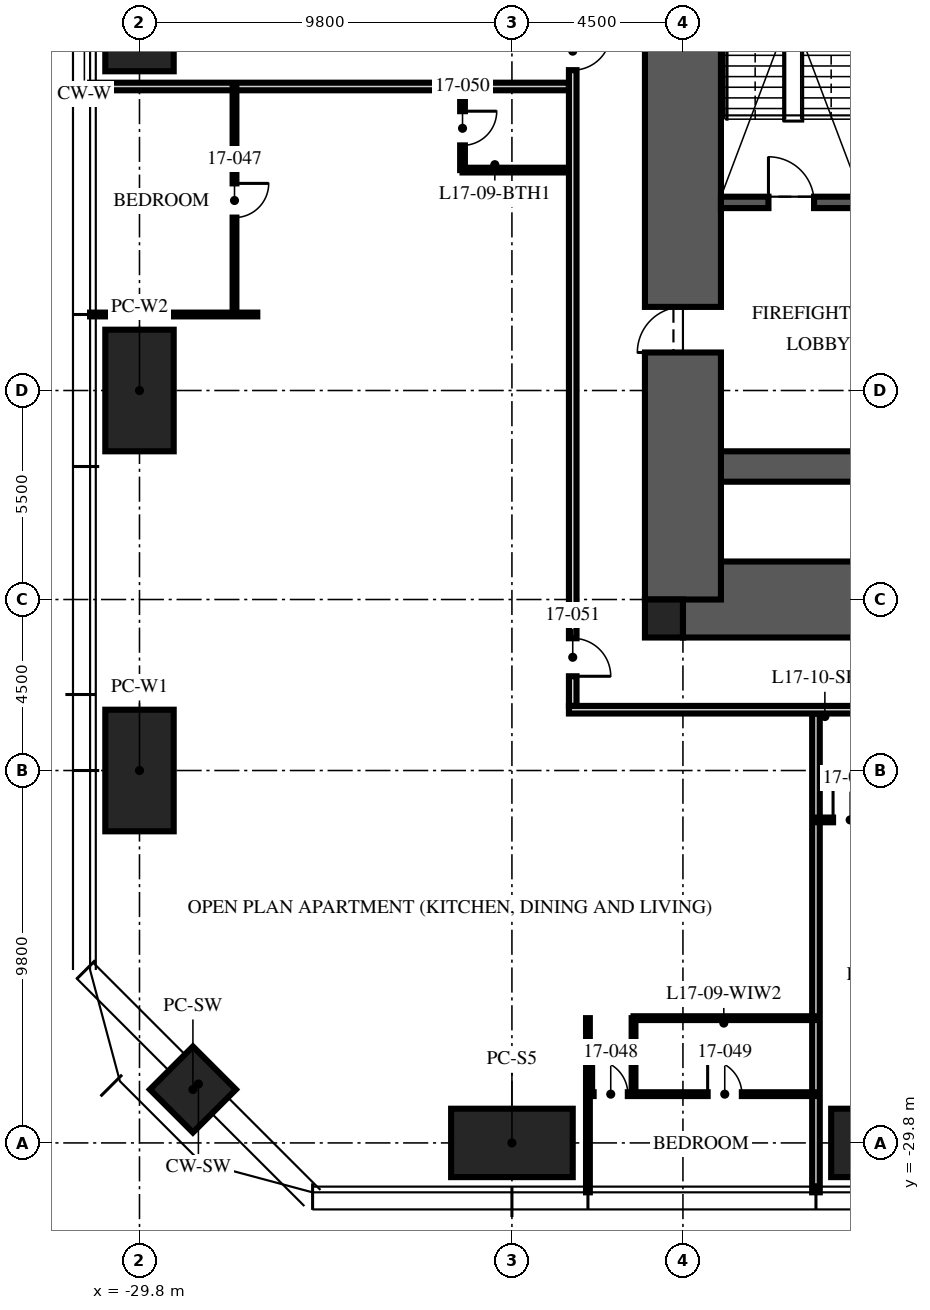
"""IFC4 building model, lengths in metres.
Left out: names, types, materials, properties, quantities, classifications, styles, units other than length and angle.
Written with IfcOpenShell. Run it as: python <this file> out.ifc"""

import sys

from ifc_helpers import new_model, si_unit, direction, frame, frame_2d, origin, origin_2d, place, context, subcontext, project, spatial, rectangle, hollow_rectangle, extrude, element, fill, save


model = new_model("IFC4")
c1 = context("Model", 3, precision=1e-05, world=origin(), true_north=direction((0.0, 1.0)))
c2 = subcontext(c1, "Body", "Model", "MODEL_VIEW")
j1 = project(units=[si_unit("LENGTHUNIT", "METRE"), si_unit("PLANEANGLEUNIT", "RADIAN")], contexts=[c1])
p1 = place(None, origin())
s1 = spatial("IfcSite", under=j1, at=p1, CompositionType="ELEMENT")
p2 = place(p1, origin())
s2 = spatial("IfcBuilding", under=s1, at=p2, CompositionType="ELEMENT")
p3 = place(p2, frame((0.0, 0.0, 69.75)))
s3 = spatial("IfcBuildingStorey", under=s2, at=p3, CompositionType="ELEMENT", Elevation=69.75)
p4 = place(p3, frame((-15.5, -15.5, -0.25), z_axis=(0.0, 0.0, 1.0), x_axis=(1.0, 0.0, 0.0)))
e1 = element("IfcWall", 1, at=p4, inside=s3, PredefinedType="SHEAR", context=c2, shape_type="SweptSolid", body=[
    extrude(rectangle(XDim=31.0, YDim=2.0, at=frame_2d((15.5, 0.0))), origin(), (0.0, 0.0, 1.0), 3.75),
])
p5 = place(p3, frame((-15.5, -12.0, -0.25), z_axis=(0.0, 0.0, 1.0), x_axis=(1.0, 0.0, 0.0)))
e2 = element("IfcWall", 2, at=p5, inside=s3, PredefinedType="SHEAR", context=c2, shape_type="SweptSolid", body=[
    extrude(rectangle(XDim=31.0, YDim=0.8, at=frame_2d((15.5, 0.0))), origin(), (0.0, 0.0, 1.0), 3.75),
])
p6 = place(p3, frame((-15.5, -15.5, -0.25), z_axis=(0.0, 0.0, 1.0), x_axis=(0.0, 1.0, 0.0)))
e3 = element("IfcWall", 3, at=p6, inside=s3, PredefinedType="SHEAR", context=c2, shape_type="SweptSolid", body=[
    extrude(rectangle(XDim=31.0, YDim=2.0, at=frame_2d((15.5, 0.0))), origin(), (0.0, 0.0, 1.0), 3.75),
])
p7 = place(p6, frame((6.5, 0.0, 0.25)))
e4 = element("IfcOpeningElement", 4, at=p7, cuts=e3, PredefinedType="OPENING", context=c2, shape_type="SweptSolid", body=[
    extrude(rectangle(XDim=1.2, YDim=2.1, at=frame_2d((0.6, 1.05))), frame((0.0, 1.01, 0.0), z_axis=(0.0, -1.0, 0.0), x_axis=(1.0, 0.0, 0.0)), (0.0, 0.0, 1.0), 2.02),
])
p8 = place(p6, frame((23.0, 0.0, 0.25)))
e5 = element("IfcOpeningElement", 5, at=p8, cuts=e3, PredefinedType="OPENING", context=c2, shape_type="SweptSolid", body=[
    extrude(rectangle(XDim=1.8, YDim=2.1, at=frame_2d((0.9, 1.05))), frame((0.0, 1.01, 0.0), z_axis=(0.0, -1.0, 0.0), x_axis=(1.0, 0.0, 0.0)), (0.0, 0.0, 1.0), 2.02),
])
p9 = place(p3, frame((-16.0, -16.0, -0.25), z_axis=(0.0, 0.0, 1.0), x_axis=(1.0, 0.0, 0.0)))
e6 = element("IfcColumn", 6, at=p9, inside=s3, PredefinedType="COLUMN", context=c2, shape_type="SweptSolid", body=[
    extrude(rectangle(XDim=1.0, YDim=1.0, at=origin_2d()), origin(), (0.0, 0.0, 1.0), 3.75),
])
for number, where, z_axis, x_axis in (
    (7, (-10.0, -29.8, 0.0), (0.0, 0.0, 1.0), (1.0, 0.0, 0.0)),
    (8, (-20.0, -29.8, 0.0), (0.0, 0.0, 1.0), (1.0, 0.0, 0.0)),
    (9, (-29.8, -20.0, 0.0), (0.0, 0.0, 1.0), (0.0, 1.0, 0.0)),
    (10, (-29.8, -10.0, 0.0), (0.0, 0.0, 1.0), (0.0, 1.0, 0.0)),
    (11, (-29.8, 0.0, 0.0), (0.0, 0.0, 1.0), (0.0, 1.0, 0.0)),
):
    element("IfcColumn", number, at=place(p3, frame(where, z_axis=z_axis, x_axis=x_axis)), inside=s3, PredefinedType="COLUMN", context=c2, shape_type="SweptSolid", body=[
        extrude(hollow_rectangle(XDim=3.2, YDim=1.8, WallThickness=0.2, at=origin_2d()), origin(), (0.0, 0.0, 1.0), 3.75),
    ])
p10 = place(p3, frame((-28.394, -28.394, 0.0), z_axis=(0.0, 0.0, 1.0), x_axis=(0.707106781187, -0.707106781187, 0.0)))
e12 = element("IfcColumn", 12, at=p10, inside=s3, PredefinedType="COLUMN", context=c2, shape_type="SweptSolid", body=[
    extrude(hollow_rectangle(XDim=1.6, YDim=1.6, WallThickness=0.1, at=origin_2d()), origin(), (0.0, 0.0, 1.0), 3.75),
])
p11 = place(p3, frame((-14.5, -5.05, 0.0), z_axis=(0.0, 0.0, 1.0), x_axis=(1.0, 0.0, 0.0)))
e13 = element("IfcWall", 13, at=p11, inside=s3, PredefinedType="SOLIDWALL", context=c2, shape_type="SweptSolid", body=[
    extrude(rectangle(XDim=5.7, YDim=0.3, at=frame_2d((2.85, 0.0))), origin(), (0.0, 0.0, 1.0), 3.5),
])
p12 = place(p11, frame((1.25, 0.0, 0.0)))
e14 = element("IfcOpeningElement", 14, at=p12, cuts=e13, PredefinedType="OPENING", context=c2, shape_type="SweptSolid", body=[
    extrude(rectangle(XDim=1.2, YDim=2.1, at=frame_2d((0.6, 1.05))), frame((0.0, 0.16, 0.0), z_axis=(0.0, -1.0, 0.0), x_axis=(1.0, 0.0, 0.0)), (0.0, 0.0, 1.0), 0.32),
])
p13 = place(p3, frame((-18.5, -2.0, 0.0), z_axis=(0.0, 0.0, 1.0), x_axis=(-1.0, 0.0, 0.0)))
e15 = element("IfcWall", 15, at=p13, inside=s3, PredefinedType="PARTITIONING", context=c2, shape_type="SweptSolid", body=[
    extrude(rectangle(XDim=12.6, YDim=0.2, at=frame_2d((6.3, 0.0))), origin(), (0.0, 0.0, 1.0), 2.71),
])
p14 = place(p3, frame((-26.7, -8.0, 0.0), z_axis=(0.0, 0.0, 1.0), x_axis=(-1.0, 0.0, 0.0)))
e16 = element("IfcWall", 16, at=p14, inside=s3, PredefinedType="PARTITIONING", context=c2, shape_type="SweptSolid", body=[
    extrude(rectangle(XDim=4.4, YDim=0.1, at=frame_2d((2.2, 0.0))), origin(), (0.0, 0.0, 1.0), 2.71),
])
p15 = place(p3, frame((-18.0, -26.517, 0.0), z_axis=(0.0, 0.0, 1.0), x_axis=(0.0, -1.0, 0.0)))
e17 = element("IfcWall", 17, at=p15, inside=s3, PredefinedType="PARTITIONING", context=c2, shape_type="SweptSolid", body=[
    extrude(rectangle(XDim=4.583, YDim=0.1, at=frame_2d((2.292, 0.0))), origin(), (0.0, 0.0, 1.0), 2.71),
])
p16 = place(p3, frame((-12.0, -18.5, 0.0), z_axis=(0.0, 0.0, 1.0), x_axis=(0.0, -1.0, 0.0)))
e18 = element("IfcWall", 18, at=p16, inside=s3, PredefinedType="PARTITIONING", context=c2, shape_type="SweptSolid", body=[
    extrude(rectangle(XDim=12.6, YDim=0.2, at=frame_2d((6.3, 0.0))), origin(), (0.0, 0.0, 1.0), 2.71),
])
p17 = place(p3, frame((-27.3, -2.0, 0.0), z_axis=(0.0, 0.0, 1.0), x_axis=(0.0, -1.0, 0.0)))
e19 = element("IfcWall", 19, at=p17, inside=s3, PredefinedType="PARTITIONING", context=c2, shape_type="SweptSolid", body=[
    extrude(rectangle(XDim=6.0, YDim=0.1, at=frame_2d((3.0, 0.0))), origin(), (0.0, 0.0, 1.0), 2.61),
])
p18 = place(p17, frame((2.55, 0.0, 0.0)))
e20 = element("IfcOpeningElement", 20, at=p18, cuts=e19, PredefinedType="OPENING", context=c2, shape_type="SweptSolid", body=[
    extrude(rectangle(XDim=0.9, YDim=2.1, at=frame_2d((0.45, 1.05))), frame((0.0, 0.06, 0.0), z_axis=(0.0, -1.0, 0.0), x_axis=(1.0, 0.0, 0.0)), (0.0, 0.0, 1.0), 0.12),
])
p19 = place(p3, frame((-18.0, -28.517, 0.0), z_axis=(0.0, 0.0, 1.0), x_axis=(1.0, 0.0, 0.0)))
e21 = element("IfcWall", 21, at=p19, inside=s3, PredefinedType="PARTITIONING", context=c2, shape_type="SweptSolid", body=[
    extrude(rectangle(XDim=6.0, YDim=0.1, at=frame_2d((3.0, 0.0))), origin(), (0.0, 0.0, 1.0), 2.61),
])
p20 = place(p19, frame((0.15, 0.0, 0.0)))
e22 = element("IfcOpeningElement", 22, at=p20, cuts=e21, PredefinedType="OPENING", context=c2, shape_type="SweptSolid", body=[
    extrude(rectangle(XDim=0.9, YDim=2.1, at=frame_2d((0.45, 1.05))), frame((0.0, 0.06, 0.0), z_axis=(0.0, -1.0, 0.0), x_axis=(1.0, 0.0, 0.0)), (0.0, 0.0, 1.0), 0.12),
])
p21 = place(p19, frame((3.15, 0.0, 0.0)))
e23 = element("IfcOpeningElement", 23, at=p21, cuts=e21, PredefinedType="OPENING", context=c2, shape_type="SweptSolid", body=[
    extrude(rectangle(XDim=0.9, YDim=2.1, at=frame_2d((0.45, 1.05))), frame((0.0, 0.06, 0.0), z_axis=(0.0, -1.0, 0.0), x_axis=(1.0, 0.0, 0.0)), (0.0, 0.0, 1.0), 0.12),
])
p22 = place(p3, frame((-16.8, -26.517, 0.0), z_axis=(0.0, 0.0, 1.0), x_axis=(0.0, -1.0, 0.0)))
e24 = element("IfcWall", 24, at=p22, inside=s3, PredefinedType="PARTITIONING", context=c2, shape_type="SweptSolid", body=[
    extrude(rectangle(XDim=2.0, YDim=0.1, at=frame_2d((1.0, 0.0))), origin(), (0.0, 0.0, 1.0), 3.5),
])
p23 = place(p3, frame((-16.8, -26.517, 0.0), z_axis=(0.0, 0.0, 1.0), x_axis=(1.0, 0.0, 0.0)))
e25 = element("IfcWall", 25, at=p23, inside=s3, PredefinedType="PARTITIONING", context=c2, shape_type="SweptSolid", body=[
    extrude(rectangle(XDim=4.8, YDim=0.1, at=frame_2d((2.4, 0.0))), origin(), (0.0, 0.0, 1.0), 2.61),
])
p24 = place(p3, frame((-21.3, -2.0, 0.0), z_axis=(0.0, 0.0, 1.0), x_axis=(0.0, -1.0, 0.0)))
e26 = element("IfcWall", 26, at=p24, inside=s3, PredefinedType="PARTITIONING", context=c2, shape_type="SweptSolid", body=[
    extrude(rectangle(XDim=2.2, YDim=0.125, at=frame_2d((1.1, 0.0))), origin(), (0.0, 0.0, 1.0), 3.5),
])
p25 = place(p24, frame((0.65, 0.0, 0.0)))
e27 = element("IfcOpeningElement", 27, at=p25, cuts=e26, PredefinedType="OPENING", context=c2, shape_type="SweptSolid", body=[
    extrude(rectangle(XDim=0.9, YDim=2.1, at=frame_2d((0.45, 1.05))), frame((0.0, 0.073, 0.0), z_axis=(0.0, -1.0, 0.0), x_axis=(1.0, 0.0, 0.0)), (0.0, 0.0, 1.0), 0.145),
])
p26 = place(p3, frame((-18.5, -4.2, 0.0), z_axis=(0.0, 0.0, 1.0), x_axis=(-1.0, 0.0, 0.0)))
e28 = element("IfcWall", 28, at=p26, inside=s3, PredefinedType="PARTITIONING", context=c2, shape_type="SweptSolid", body=[
    extrude(rectangle(XDim=2.8, YDim=0.125, at=frame_2d((1.4, 0.0))), origin(), (0.0, 0.0, 1.0), 3.5),
])
p27 = place(p3, frame((-12.0, -21.3, 0.0), z_axis=(0.0, 0.0, 1.0), x_axis=(1.0, 0.0, 0.0)))
e29 = element("IfcWall", 29, at=p27, inside=s3, PredefinedType="PARTITIONING", context=c2, shape_type="SweptSolid", body=[
    extrude(rectangle(XDim=1.8, YDim=0.125, at=frame_2d((0.9, 0.0))), origin(), (0.0, 0.0, 1.0), 3.5),
])
p28 = place(p27, frame((0.45, 0.0, 0.0)))
e30 = element("IfcOpeningElement", 30, at=p28, cuts=e29, PredefinedType="OPENING", context=c2, shape_type="SweptSolid", body=[
    extrude(rectangle(XDim=0.9, YDim=2.1, at=frame_2d((0.45, 1.05))), frame((0.0, 0.073, 0.0), z_axis=(0.0, -1.0, 0.0), x_axis=(1.0, 0.0, 0.0)), (0.0, 0.0, 1.0), 0.145),
])
p29 = place(p3, frame((-18.4, 18.3, 0.0), z_axis=(0.0, 0.0, 1.0), x_axis=(0.0, -1.0, 0.0)))
e31 = element("IfcWall", 31, at=p29, inside=s3, PredefinedType="PARTITIONING", context=c2, shape_type="SweptSolid", body=[
    extrude(rectangle(XDim=36.6, YDim=0.2, at=frame_2d((18.3, 0.0))), origin(), (0.0, 0.0, 1.0), 2.3),
])
p30 = place(p29, frame((8.57, 0.0, 0.0)))
e32 = element("IfcOpeningElement", 32, at=p30, cuts=e31, PredefinedType="OPENING", context=c2, shape_type="SweptSolid", body=[
    extrude(rectangle(XDim=1.0, YDim=2.2, at=frame_2d((0.5, 1.1))), frame((0.0, 0.11, 0.0), z_axis=(0.0, -1.0, 0.0), x_axis=(1.0, 0.0, 0.0)), (0.0, 0.0, 1.0), 0.22),
])
p31 = place(p29, frame((14.87, 0.0, 0.0)))
e33 = element("IfcOpeningElement", 33, at=p31, cuts=e31, PredefinedType="OPENING", context=c2, shape_type="SweptSolid", body=[
    extrude(rectangle(XDim=1.0, YDim=2.2, at=frame_2d((0.5, 1.1))), frame((0.0, 0.11, 0.0), z_axis=(0.0, -1.0, 0.0), x_axis=(1.0, 0.0, 0.0)), (0.0, 0.0, 1.0), 0.22),
])
p32 = place(p29, frame((18.87, 0.0, 0.0)))
e34 = element("IfcOpeningElement", 34, at=p32, cuts=e31, PredefinedType="OPENING", context=c2, shape_type="SweptSolid", body=[
    extrude(rectangle(XDim=1.0, YDim=2.2, at=frame_2d((0.5, 1.1))), frame((0.0, 0.11, 0.0), z_axis=(0.0, -1.0, 0.0), x_axis=(1.0, 0.0, 0.0)), (0.0, 0.0, 1.0), 0.22),
])
p33 = place(p29, frame((34.82, 0.0, 0.0)))
e35 = element("IfcOpeningElement", 35, at=p33, cuts=e31, PredefinedType="OPENING", context=c2, shape_type="SweptSolid", body=[
    extrude(rectangle(XDim=1.0, YDim=2.2, at=frame_2d((0.5, 1.1))), frame((0.0, 0.11, 0.0), z_axis=(0.0, -1.0, 0.0), x_axis=(1.0, 0.0, 0.0)), (0.0, 0.0, 1.0), 0.22),
])
p34 = place(p3, frame((0.0, -18.4, 0.0), z_axis=(0.0, 0.0, 1.0), x_axis=(-1.0, 0.0, 0.0)))
e36 = element("IfcWall", 36, at=p34, inside=s3, PredefinedType="PARTITIONING", context=c2, shape_type="SweptSolid", body=[
    extrude(rectangle(XDim=18.5, YDim=0.2, at=frame_2d((9.25, 0.0))), origin(), (0.0, 0.0, 1.0), 2.3),
])
p35 = place(p34, frame((8.43, 0.0, 0.0)))
e37 = element("IfcOpeningElement", 37, at=p35, cuts=e36, PredefinedType="OPENING", context=c2, shape_type="SweptSolid", body=[
    extrude(rectangle(XDim=1.0, YDim=2.2, at=frame_2d((0.5, 1.1))), frame((0.0, 0.11, 0.0), z_axis=(0.0, -1.0, 0.0), x_axis=(1.0, 0.0, 0.0)), (0.0, 0.0, 1.0), 0.22),
])
p36 = place(p34, frame((2.43, 0.0, 0.0)))
e38 = element("IfcOpeningElement", 38, at=p36, cuts=e36, PredefinedType="OPENING", context=c2, shape_type="SweptSolid", body=[
    extrude(rectangle(XDim=1.0, YDim=2.2, at=frame_2d((0.5, 1.1))), frame((0.0, 0.11, 0.0), z_axis=(0.0, -1.0, 0.0), x_axis=(1.0, 0.0, 0.0)), (0.0, 0.0, 1.0), 0.22),
])
p37 = place(p12, origin())
e39 = element("IfcDoor", 39, at=p37, inside=s3, OperationType="SINGLE_SWING_LEFT", PredefinedType="DOOR", context=c2, shape_type="SweptSolid", body=[
    extrude(rectangle(XDim=1.2, YDim=2.1, at=frame_2d((0.6, 1.05))), frame((0.0, 0.025, 0.0), z_axis=(0.0, -1.0, 0.0), x_axis=(1.0, 0.0, 0.0)), (0.0, 0.0, 1.0), 0.05),
])
fill(e14, e39)
p38 = place(p7, origin())
e40 = element("IfcDoor", 40, at=p38, inside=s3, OperationType="SINGLE_SWING_LEFT", PredefinedType="DOOR", context=c2, shape_type="SweptSolid", body=[
    extrude(rectangle(XDim=1.2, YDim=2.1, at=frame_2d((0.6, 1.05))), frame((0.0, 0.025, 0.0), z_axis=(0.0, -1.0, 0.0), x_axis=(1.0, 0.0, 0.0)), (0.0, 0.0, 1.0), 0.05),
])
fill(e4, e40)
p39 = place(p32, origin())
e41 = element("IfcDoor", 41, at=p39, inside=s3, OperationType="SINGLE_SWING_LEFT", PredefinedType="DOOR", context=c2, shape_type="SweptSolid", body=[
    extrude(rectangle(XDim=1.0, YDim=2.2, at=frame_2d((0.5, 1.1))), frame((0.0, 0.025, 0.0), z_axis=(0.0, -1.0, 0.0), x_axis=(1.0, 0.0, 0.0)), (0.0, 0.0, 1.0), 0.05),
])
fill(e34, e41)
p40 = place(p18, origin())
e42 = element("IfcDoor", 42, at=p40, inside=s3, OperationType="SINGLE_SWING_LEFT", PredefinedType="DOOR", context=c2, shape_type="SweptSolid", body=[
    extrude(rectangle(XDim=0.9, YDim=2.1, at=frame_2d((0.45, 1.05))), frame((0.0, 0.025, 0.0), z_axis=(0.0, -1.0, 0.0), x_axis=(1.0, 0.0, 0.0)), (0.0, 0.0, 1.0), 0.05),
])
fill(e20, e42)
p41 = place(p20, origin())
e43 = element("IfcDoor", 43, at=p41, inside=s3, OperationType="SINGLE_SWING_LEFT", PredefinedType="DOOR", context=c2, shape_type="SweptSolid", body=[
    extrude(rectangle(XDim=0.9, YDim=2.1, at=frame_2d((0.45, 1.05))), frame((0.0, 0.025, 0.0), z_axis=(0.0, -1.0, 0.0), x_axis=(1.0, 0.0, 0.0)), (0.0, 0.0, 1.0), 0.05),
])
fill(e22, e43)
p42 = place(p21, origin())
e44 = element("IfcDoor", 44, at=p42, inside=s3, OperationType="SINGLE_SWING_LEFT", PredefinedType="DOOR", context=c2, shape_type="SweptSolid", body=[
    extrude(rectangle(XDim=0.9, YDim=2.1, at=frame_2d((0.45, 1.05))), frame((0.0, 0.025, 0.0), z_axis=(0.0, -1.0, 0.0), x_axis=(1.0, 0.0, 0.0)), (0.0, 0.0, 1.0), 0.05),
])
fill(e23, e44)
p43 = place(p25, origin())
e45 = element("IfcDoor", 45, at=p43, inside=s3, OperationType="SINGLE_SWING_LEFT", PredefinedType="DOOR", context=c2, shape_type="SweptSolid", body=[
    extrude(rectangle(XDim=0.9, YDim=2.1, at=frame_2d((0.45, 1.05))), frame((0.0, 0.025, 0.0), z_axis=(0.0, -1.0, 0.0), x_axis=(1.0, 0.0, 0.0)), (0.0, 0.0, 1.0), 0.05),
])
fill(e27, e45)
p44 = place(p33, origin())
e46 = element("IfcDoor", 46, at=p44, inside=s3, OperationType="SINGLE_SWING_RIGHT", PredefinedType="DOOR", context=c2, shape_type="SweptSolid", body=[
    extrude(rectangle(XDim=1.0, YDim=2.2, at=frame_2d((0.5, 1.1))), frame((0.0, 0.025, 0.0), z_axis=(0.0, -1.0, 0.0), x_axis=(1.0, 0.0, 0.0)), (0.0, 0.0, 1.0), 0.05),
])
fill(e35, e46)
p45 = place(p28, origin())
e47 = element("IfcDoor", 47, at=p45, inside=s3, OperationType="SINGLE_SWING_LEFT", PredefinedType="DOOR", context=c2, shape_type="SweptSolid", body=[
    extrude(rectangle(XDim=0.9, YDim=2.1, at=frame_2d((0.45, 1.05))), frame((0.0, 0.025, 0.0), z_axis=(0.0, -1.0, 0.0), x_axis=(1.0, 0.0, 0.0)), (0.0, 0.0, 1.0), 0.05),
])
fill(e30, e47)
save(model, sys.argv[1])
